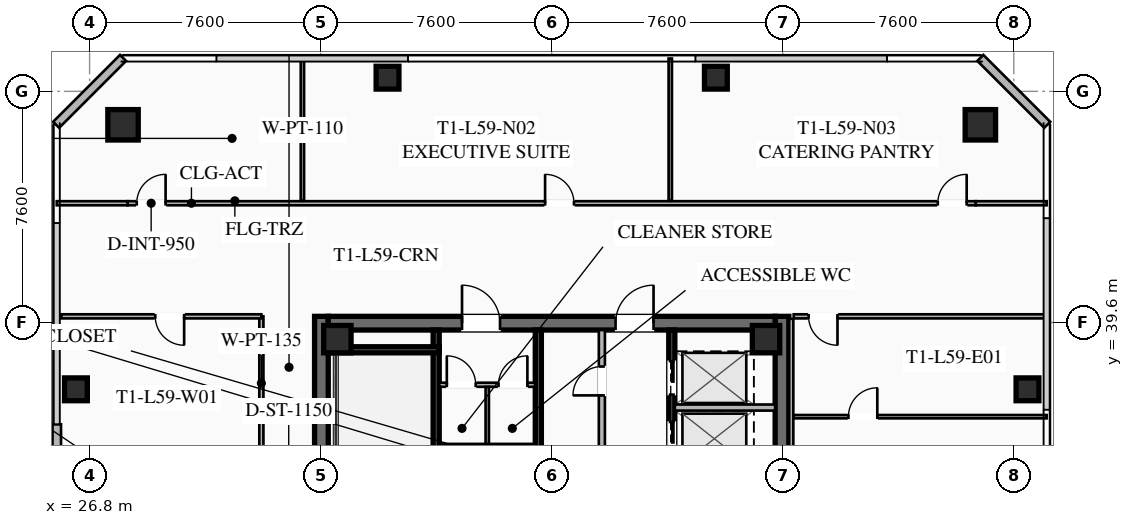
"""IFC4 building model, lengths in metres.
Left out: names, types, materials, properties, quantities, classifications, styles, units other than length and angle.
Written with IfcOpenShell. Run it as: python <this file> out.ifc"""

import sys

from ifc_helpers import new_model, si_unit, direction, frame, frame_2d, origin, origin_2d, place, context, subcontext, project, spatial, rectangle, hollow_rectangle, extrude, element, fill, save


model = new_model("IFC4")
c1 = context("Model", 3, precision=1e-05, world=origin(), true_north=direction((0.0, 1.0)))
c2 = subcontext(c1, "Body", "Model", "MODEL_VIEW")
j1 = project(units=[si_unit("LENGTHUNIT", "METRE"), si_unit("PLANEANGLEUNIT", "RADIAN")], contexts=[c1])
p1 = place(None, origin())
s1 = spatial("IfcSite", under=j1, at=p1, CompositionType="ELEMENT")
p2 = place(p1, origin())
s2 = spatial("IfcBuilding", under=s1, at=p2, CompositionType="ELEMENT")
p3 = place(p2, frame((0.0, 0.0, 218.4)))
s3 = spatial("IfcBuildingStorey", under=s2, at=p3, CompositionType="ELEMENT", Elevation=218.4)
for number, where, z_axis, x_axis in (
    (1, (34.425, 24.2, 0.0), (0.0, 0.0, 1.0), (0.0, 1.0, 0.0)),
    (2, (49.575, 39.8, 0.0), (0.0, 0.0, 1.0), (0.0, -1.0, 0.0)),
):
    element("IfcWall", number, at=place(p3, frame(where, z_axis=z_axis, x_axis=x_axis)), inside=s3, PredefinedType="SHEAR", context=c2, shape_type="SweptSolid", body=[
        extrude(rectangle(XDim=15.6, YDim=0.45, at=frame_2d((7.8, 0.0))), origin(), (0.0, 0.0, 1.0), 3.55),
    ])
p4 = place(p3, frame((34.65, 39.575, 0.0), z_axis=(0.0, 0.0, 1.0), x_axis=(1.0, 0.0, 0.0)))
e3 = element("IfcWall", 3, at=p4, inside=s3, PredefinedType="SHEAR", context=c2, shape_type="SweptSolid", body=[
    extrude(rectangle(XDim=14.7, YDim=0.45, at=frame_2d((7.35, 0.0))), origin(), (0.0, 0.0, 1.0), 3.55),
])
p5 = place(p4, frame((4.4, 0.0, 0.0)))
e4 = element("IfcOpeningElement", 4, at=p5, cuts=e3, PredefinedType="OPENING", context=c2, shape_type="SweptSolid", body=[
    extrude(rectangle(XDim=1.25, YDim=2.25, at=frame_2d((0.625, 1.125))), frame((0.0, 0.235, 0.0), z_axis=(0.0, -1.0, 0.0), x_axis=(1.0, 0.0, 0.0)), (0.0, 0.0, 1.0), 0.47),
])
p6 = place(p4, frame((9.45, 0.0, 0.0)))
e5 = element("IfcOpeningElement", 5, at=p6, cuts=e3, PredefinedType="OPENING", context=c2, shape_type="SweptSolid", body=[
    extrude(rectangle(XDim=1.25, YDim=2.25, at=frame_2d((0.625, 1.125))), frame((0.0, 0.235, 0.0), z_axis=(0.0, -1.0, 0.0), x_axis=(1.0, 0.0, 0.0)), (0.0, 0.0, 1.0), 0.47),
])
for number, where, z_axis, x_axis in (
    (6, (49.05, 39.05, 0.0), (0.0, 0.0, 1.0), (1.0, 0.0, 0.0)),
    (7, (34.95, 39.05, 0.0), (0.0, 0.0, 1.0), (1.0, 0.0, 0.0)),
):
    element("IfcColumn", number, at=place(p3, frame(where, z_axis=z_axis, x_axis=x_axis)), inside=s3, PredefinedType="COLUMN", context=c2, shape_type="SweptSolid", body=[
        extrude(hollow_rectangle(XDim=0.9, YDim=0.9, WallThickness=0.04, at=origin_2d()), origin(), (0.0, 0.0, 1.0), 3.37),
    ])
for number, where, z_axis, x_axis in (
    (8, (56.1, 46.1, 0.0), (0.0, 0.0, 1.0), (1.0, 0.0, 0.0)),
    (9, (27.9, 46.1, 0.0), (0.0, 0.0, 1.0), (1.0, 0.0, 0.0)),
):
    element("IfcColumn", number, at=place(p3, frame(where, z_axis=z_axis, x_axis=x_axis)), inside=s3, PredefinedType="COLUMN", context=c2, shape_type="SweptSolid", body=[
        extrude(hollow_rectangle(XDim=1.0, YDim=1.0, WallThickness=0.04, at=origin_2d()), origin(), (0.0, 0.0, 1.0), 3.37),
    ])
for number, where, z_axis, x_axis in (
    (10, (57.65, 37.4, 0.0), (0.0, 0.0, 1.0), (1.0, 0.0, 0.0)),
    (11, (47.4, 47.65, 0.0), (0.0, 0.0, 1.0), (1.0, 0.0, 0.0)),
    (12, (36.6, 47.65, 0.0), (0.0, 0.0, 1.0), (1.0, 0.0, 0.0)),
    (13, (26.35, 37.4, 0.0), (0.0, 0.0, 1.0), (1.0, 0.0, 0.0)),
):
    element("IfcColumn", number, at=place(p3, frame(where, z_axis=z_axis, x_axis=x_axis)), inside=s3, PredefinedType="COLUMN", context=c2, shape_type="SweptSolid", body=[
        extrude(hollow_rectangle(XDim=0.75, YDim=0.75, WallThickness=0.032, at=origin_2d()), origin(), (0.0, 0.0, 1.0), 3.37),
    ])
p7 = place(p3, frame((25.72, 27.75, 0.0), z_axis=(0.0, 0.0, 1.0), x_axis=(0.0, 1.0, 0.0)))
e14 = element("IfcWall", 14, at=p7, inside=s3, PredefinedType="SOLIDWALL", context=c2, shape_type="SweptSolid", body=[
    extrude(rectangle(XDim=8.5, YDim=0.28, at=frame_2d((4.25, 0.0))), origin(), (0.0, 0.0, 1.0), 3.37),
])
p8 = place(p7, frame((3.6, 0.0, 0.0)))
e15 = element("IfcOpeningElement", 15, at=p8, cuts=e14, PredefinedType="OPENING", context=c2, shape_type="SweptSolid", body=[
    extrude(rectangle(XDim=1.3, YDim=2.15, at=frame_2d((0.65, 1.075))), frame((0.0, 0.15, 0.0), z_axis=(0.0, -1.0, 0.0), x_axis=(1.0, 0.0, 0.0)), (0.0, 0.0, 1.0), 0.3),
])
p9 = place(p7, frame((1.46, 0.0, 0.85)))
e16 = element("IfcOpeningElement", 16, at=p9, cuts=e14, PredefinedType="OPENING", context=c2, shape_type="SweptSolid", body=[
    extrude(rectangle(XDim=1.8, YDim=1.92, at=frame_2d((0.9, 0.96))), frame((0.0, 0.15, 0.0), z_axis=(0.0, -1.0, 0.0), x_axis=(1.0, 0.0, 0.0)), (0.0, 0.0, 1.0), 0.3),
])
for number, where, z_axis, x_axis in (
    (17, (25.7, 46.1, 0.0), (0.0, 0.0, 1.0), (0.707, 0.707, 0.0)),
    (18, (56.1, 48.3, 0.0), (0.0, 0.0, 1.0), (0.707, -0.707, 0.0)),
):
    element("IfcWall", number, at=place(p3, frame(where, z_axis=z_axis, x_axis=x_axis)), inside=s3, PredefinedType="SOLIDWALL", context=c2, shape_type="SweptSolid", body=[
        extrude(rectangle(XDim=3.111, YDim=0.28, at=frame_2d((1.556, 0.0))), origin(), (0.0, 0.0, 1.0), 3.37),
    ])
p10 = place(p3, frame((38.2, 31.2, 0.0), z_axis=(0.0, 0.0, 1.0), x_axis=(0.0, 1.0, 0.0)))
e19 = element("IfcWall", 19, at=p10, inside=s3, PredefinedType="SHEAR", context=c2, shape_type="SweptSolid", body=[
    extrude(rectangle(XDim=8.15, YDim=0.2, at=frame_2d((4.075, 0.0))), origin(), (0.0, 0.0, 1.0), 3.37),
])
p11 = place(p10, frame((0.45, 0.0, 0.0)))
e20 = element("IfcOpeningElement", 20, at=p11, cuts=e19, PredefinedType="OPENING", context=c2, shape_type="SweptSolid", body=[
    extrude(rectangle(XDim=1.15, YDim=2.2, at=frame_2d((0.575, 1.1))), frame((0.0, 0.11, 0.0), z_axis=(0.0, -1.0, 0.0), x_axis=(1.0, 0.0, 0.0)), (0.0, 0.0, 1.0), 0.22),
])
p12 = place(p3, frame((34.65, 38.7, 0.0), z_axis=(0.0, 0.0, 1.0), x_axis=(1.0, 0.0, 0.0)))
e21 = element("IfcWall", 21, at=p12, inside=s3, PredefinedType="SHEAR", context=c2, shape_type="SweptSolid", body=[
    extrude(rectangle(XDim=3.65, YDim=0.2, at=frame_2d((1.825, 0.0))), origin(), (0.0, 0.0, 1.0), 3.37),
])
p13 = place(p3, frame((41.56, 24.65, 0.0), z_axis=(0.0, 0.0, 1.0), x_axis=(0.0, 1.0, 0.0)))
e22 = element("IfcWall", 22, at=p13, inside=s3, PredefinedType="SHEAR", context=c2, shape_type="SweptSolid", body=[
    extrude(rectangle(XDim=14.7, YDim=0.2, at=frame_2d((7.35, 0.0))), origin(), (0.0, 0.0, 1.0), 3.37),
])
p14 = place(p3, frame((45.95, 39.35, 0.0), z_axis=(0.0, 0.0, 1.0), x_axis=(0.0, -1.0, 0.0)))
e23 = element("IfcWall", 23, at=p14, inside=s3, PredefinedType="SHEAR", context=c2, shape_type="SweptSolid", body=[
    extrude(rectangle(XDim=6.55, YDim=0.2, at=frame_2d((3.275, 0.0))), origin(), (0.0, 0.0, 1.0), 3.37),
])
p15 = place(p14, frame((5.075, 0.0, 0.0)))
e24 = element("IfcOpeningElement", 24, at=p15, cuts=e23, PredefinedType="OPENING", context=c2, shape_type="SweptSolid", body=[
    extrude(rectangle(XDim=1.1, YDim=2.2, at=frame_2d((0.55, 1.1))), frame((0.0, 0.11, 0.0), z_axis=(0.0, -1.0, 0.0), x_axis=(1.0, 0.0, 0.0)), (0.0, 0.0, 1.0), 0.22),
])
p16 = place(p14, frame((3.025, 0.0, 0.0)))
e25 = element("IfcOpeningElement", 25, at=p16, cuts=e23, PredefinedType="OPENING", context=c2, shape_type="SweptSolid", body=[
    extrude(rectangle(XDim=1.1, YDim=2.2, at=frame_2d((0.55, 1.1))), frame((0.0, 0.11, 0.0), z_axis=(0.0, -1.0, 0.0), x_axis=(1.0, 0.0, 0.0)), (0.0, 0.0, 1.0), 0.22),
])
p17 = place(p14, frame((1.025, 0.0, 0.0)))
e26 = element("IfcOpeningElement", 26, at=p17, cuts=e23, PredefinedType="OPENING", context=c2, shape_type="SweptSolid", body=[
    extrude(rectangle(XDim=1.1, YDim=2.2, at=frame_2d((0.55, 1.1))), frame((0.0, 0.11, 0.0), z_axis=(0.0, -1.0, 0.0), x_axis=(1.0, 0.0, 0.0)), (0.0, 0.0, 1.0), 0.22),
])
p18 = place(p3, frame((46.05, 36.8, 0.0), z_axis=(0.0, 0.0, 1.0), x_axis=(1.0, 0.0, 0.0)))
e27 = element("IfcWall", 27, at=p18, inside=s3, PredefinedType="SOLIDWALL", context=c2, shape_type="SweptSolid", body=[
    extrude(rectangle(XDim=3.3, YDim=0.2, at=frame_2d((1.65, 0.0))), origin(), (0.0, 0.0, 1.0), 3.37),
])
p19 = place(p3, frame((38.3, 37.55, 0.0), z_axis=(0.0, 0.0, 1.0), x_axis=(1.0, 0.0, 0.0)))
e28 = element("IfcWall", 28, at=p19, inside=s3, PredefinedType="PARTITIONING", context=c2, shape_type="SweptSolid", body=[
    extrude(rectangle(XDim=3.15, YDim=0.135, at=frame_2d((1.575, 0.0))), origin(), (0.0, 0.0, 1.0), 2.723),
])
p20 = place(p19, frame((0.25, 0.0, 0.0)))
e29 = element("IfcOpeningElement", 29, at=p20, cuts=e28, PredefinedType="OPENING", context=c2, shape_type="SweptSolid", body=[
    extrude(rectangle(XDim=0.95, YDim=2.05, at=frame_2d((0.475, 1.025))), frame((0.0, 0.077, 0.0), z_axis=(0.0, -1.0, 0.0), x_axis=(1.0, 0.0, 0.0)), (0.0, 0.0, 1.0), 0.155),
])
p21 = place(p19, frame((1.95, 0.0, 0.0)))
e30 = element("IfcOpeningElement", 30, at=p21, cuts=e28, PredefinedType="OPENING", context=c2, shape_type="SweptSolid", body=[
    extrude(rectangle(XDim=0.95, YDim=2.05, at=frame_2d((0.475, 1.025))), frame((0.0, 0.077, 0.0), z_axis=(0.0, -1.0, 0.0), x_axis=(1.0, 0.0, 0.0)), (0.0, 0.0, 1.0), 0.155),
])
p22 = place(p3, frame((39.88, 33.68, 0.0), z_axis=(0.0, 0.0, 1.0), x_axis=(0.0, 1.0, 0.0)))
e31 = element("IfcWall", 31, at=p22, inside=s3, PredefinedType="PARTITIONING", context=c2, shape_type="SweptSolid", body=[
    extrude(rectangle(XDim=3.8, YDim=0.11, at=frame_2d((1.9, 0.0))), origin(), (0.0, 0.0, 1.0), 2.723),
])
p23 = place(p3, frame((38.3, 35.55, 0.0), z_axis=(0.0, 0.0, 1.0), x_axis=(1.0, 0.0, 0.0)))
e32 = element("IfcWall", 32, at=p23, inside=s3, PredefinedType="PARTITIONING", context=c2, shape_type="SweptSolid", body=[
    extrude(rectangle(XDim=3.15, YDim=0.11, at=frame_2d((1.575, 0.0))), origin(), (0.0, 0.0, 1.0), 2.723),
])
p24 = place(p3, frame((43.65, 32.35, 0.0), z_axis=(0.0, 0.0, 1.0), x_axis=(0.0, 1.0, 0.0)))
e33 = element("IfcWall", 33, at=p24, inside=s3, PredefinedType="SOLIDWALL", context=c2, shape_type="SweptSolid", body=[
    extrude(rectangle(XDim=7.0, YDim=0.2, at=frame_2d((3.5, 0.0))), origin(), (0.0, 0.0, 1.0), 2.723),
])
p25 = place(p24, frame((0.85, 0.0, 0.0)))
e34 = element("IfcOpeningElement", 34, at=p25, cuts=e33, PredefinedType="OPENING", context=c2, shape_type="SweptSolid", body=[
    extrude(rectangle(XDim=0.95, YDim=2.05, at=frame_2d((0.475, 1.025))), frame((0.0, 0.11, 0.0), z_axis=(0.0, -1.0, 0.0), x_axis=(1.0, 0.0, 0.0)), (0.0, 0.0, 1.0), 0.22),
])
p26 = place(p24, frame((4.85, 0.0, 0.0)))
e35 = element("IfcOpeningElement", 35, at=p26, cuts=e33, PredefinedType="OPENING", context=c2, shape_type="SweptSolid", body=[
    extrude(rectangle(XDim=0.95, YDim=2.05, at=frame_2d((0.475, 1.025))), frame((0.0, 0.11, 0.0), z_axis=(0.0, -1.0, 0.0), x_axis=(1.0, 0.0, 0.0)), (0.0, 0.0, 1.0), 0.22),
])
p27 = place(p3, frame((32.45, 35.4, 0.0), z_axis=(0.0, 0.0, 1.0), x_axis=(0.0, 1.0, 0.0)))
e36 = element("IfcWall", 36, at=p27, inside=s3, PredefinedType="PARTITIONING", context=c2, shape_type="SweptSolid", body=[
    extrude(rectangle(XDim=4.4, YDim=0.135, at=frame_2d((2.2, 0.0))), origin(), (0.0, 0.0, 1.0), 2.723),
])
p28 = place(p3, frame((28.05, 43.52, 0.0), z_axis=(0.0, 0.0, 1.0), x_axis=(1.0, 0.0, 0.0)))
e37 = element("IfcWall", 37, at=p28, inside=s3, PredefinedType="PARTITIONING", context=c2, shape_type="SweptSolid", body=[
    extrude(rectangle(XDim=27.9, YDim=0.135, at=frame_2d((13.95, 0.0))), origin(), (0.0, 0.0, 1.0), 2.723),
])
p29 = place(p28, frame((0.3, 0.0, 0.0)))
e38 = element("IfcOpeningElement", 38, at=p29, cuts=e37, PredefinedType="OPENING", context=c2, shape_type="SweptSolid", body=[
    extrude(rectangle(XDim=0.95, YDim=2.05, at=frame_2d((0.475, 1.025))), frame((0.0, 0.077, 0.0), z_axis=(0.0, -1.0, 0.0), x_axis=(1.0, 0.0, 0.0)), (0.0, 0.0, 1.0), 0.155),
])
p30 = place(p28, frame((13.732, 0.0, 0.0)))
e39 = element("IfcOpeningElement", 39, at=p30, cuts=e37, PredefinedType="OPENING", context=c2, shape_type="SweptSolid", body=[
    extrude(rectangle(XDim=0.95, YDim=2.05, at=frame_2d((0.475, 1.025))), frame((0.0, 0.077, 0.0), z_axis=(0.0, -1.0, 0.0), x_axis=(1.0, 0.0, 0.0)), (0.0, 0.0, 1.0), 0.155),
])
p31 = place(p28, frame((26.65, 0.0, 0.0)))
e40 = element("IfcOpeningElement", 40, at=p31, cuts=e37, PredefinedType="OPENING", context=c2, shape_type="SweptSolid", body=[
    extrude(rectangle(XDim=0.95, YDim=2.05, at=frame_2d((0.475, 1.025))), frame((0.0, 0.077, 0.0), z_axis=(0.0, -1.0, 0.0), x_axis=(1.0, 0.0, 0.0)), (0.0, 0.0, 1.0), 0.155),
])
for number, where, z_axis, x_axis in (
    (41, (25.72, 43.52, 0.0), (0.0, 0.0, 1.0), (1.0, 0.0, 0.0)),
    (42, (55.95, 43.52, 0.0), (0.0, 0.0, 1.0), (1.0, 0.0, 0.0)),
):
    element("IfcWall", number, at=place(p3, frame(where, z_axis=z_axis, x_axis=x_axis)), inside=s3, PredefinedType="PARTITIONING", context=c2, shape_type="SweptSolid", body=[
        extrude(rectangle(XDim=2.33, YDim=0.135, at=frame_2d((1.165, 0.0))), origin(), (0.0, 0.0, 1.0), 2.723),
    ])
for number, where, z_axis, x_axis in (
    (43, (33.8, 43.6, 0.0), (0.0, 0.0, 1.0), (0.0, 1.0, 0.0)),
    (44, (45.9, 43.6, 0.0), (0.0, 0.0, 1.0), (0.0, 1.0, 0.0)),
):
    element("IfcWall", number, at=place(p3, frame(where, z_axis=z_axis, x_axis=x_axis)), inside=s3, PredefinedType="PARTITIONING", context=c2, shape_type="SweptSolid", body=[
        extrude(rectangle(XDim=4.68, YDim=0.11, at=frame_2d((2.34, 0.0))), origin(), (0.0, 0.0, 1.0), 2.723),
    ])
p32 = place(p3, frame((49.88, 39.72, 0.0), z_axis=(0.0, 0.0, 1.0), x_axis=(0.0, -1.0, 0.0)))
e45 = element("IfcWall", 45, at=p32, inside=s3, PredefinedType="PARTITIONING", context=c2, shape_type="SweptSolid", body=[
    extrude(rectangle(XDim=15.44, YDim=0.135, at=frame_2d((7.72, 0.0))), origin(), (0.0, 0.0, 1.0), 2.723),
])
p33 = place(p3, frame((58.28, 39.8, 0.0), z_axis=(0.0, 0.0, 1.0), x_axis=(-1.0, 0.0, 0.0)))
e46 = element("IfcWall", 46, at=p33, inside=s3, PredefinedType="PARTITIONING", context=c2, shape_type="SweptSolid", body=[
    extrude(rectangle(XDim=8.32, YDim=0.135, at=frame_2d((4.16, 0.0))), origin(), (0.0, 0.0, 1.0), 2.723),
])
p34 = place(p33, frame((6.88, 0.0, 0.0)))
e47 = element("IfcOpeningElement", 47, at=p34, cuts=e46, PredefinedType="OPENING", context=c2, shape_type="SweptSolid", body=[
    extrude(rectangle(XDim=0.95, YDim=2.05, at=frame_2d((0.475, 1.025))), frame((0.0, 0.077, 0.0), z_axis=(0.0, -1.0, 0.0), x_axis=(1.0, 0.0, 0.0)), (0.0, 0.0, 1.0), 0.155),
])
p35 = place(p3, frame((49.96, 36.5, 0.0), z_axis=(0.0, 0.0, 1.0), x_axis=(1.0, 0.0, 0.0)))
e48 = element("IfcWall", 48, at=p35, inside=s3, PredefinedType="PARTITIONING", context=c2, shape_type="SweptSolid", body=[
    extrude(rectangle(XDim=8.32, YDim=0.11, at=frame_2d((4.16, 0.0))), origin(), (0.0, 0.0, 1.0), 2.723),
])
p36 = place(p35, frame((1.8, 0.0, 0.0)))
e49 = element("IfcOpeningElement", 49, at=p36, cuts=e48, PredefinedType="OPENING", context=c2, shape_type="SweptSolid", body=[
    extrude(rectangle(XDim=0.95, YDim=2.05, at=frame_2d((0.475, 1.025))), frame((0.0, 0.065, 0.0), z_axis=(0.0, -1.0, 0.0), x_axis=(1.0, 0.0, 0.0)), (0.0, 0.0, 1.0), 0.13),
])
p37 = place(p3, frame((32.45, 39.8, 0.0), z_axis=(0.0, 0.0, 1.0), x_axis=(-1.0, 0.0, 0.0)))
e50 = element("IfcWall", 50, at=p37, inside=s3, PredefinedType="PARTITIONING", context=c2, shape_type="SweptSolid", body=[
    extrude(rectangle(XDim=6.58, YDim=0.135, at=frame_2d((3.29, 0.0))), origin(), (0.0, 0.0, 1.0), 2.723),
])
p38 = place(p37, frame((2.54, 0.0, 0.0)))
e51 = element("IfcOpeningElement", 51, at=p38, cuts=e50, PredefinedType="OPENING", context=c2, shape_type="SweptSolid", body=[
    extrude(rectangle(XDim=0.95, YDim=2.05, at=frame_2d((0.475, 1.025))), frame((0.0, 0.077, 0.0), z_axis=(0.0, -1.0, 0.0), x_axis=(1.0, 0.0, 0.0)), (0.0, 0.0, 1.0), 0.155),
])
p39 = place(p5, origin())
e52 = element("IfcDoor", 52, at=p39, inside=s3, OperationType="SINGLE_SWING_LEFT", PredefinedType="DOOR", context=c2, shape_type="SweptSolid", body=[
    extrude(rectangle(XDim=1.25, YDim=2.25, at=frame_2d((0.625, 1.125))), frame((0.0, 0.025, 0.0), z_axis=(0.0, -1.0, 0.0), x_axis=(1.0, 0.0, 0.0)), (0.0, 0.0, 1.0), 0.05),
])
fill(e4, e52)
p40 = place(p6, origin())
e53 = element("IfcDoor", 53, at=p40, inside=s3, OperationType="SINGLE_SWING_RIGHT", PredefinedType="DOOR", context=c2, shape_type="SweptSolid", body=[
    extrude(rectangle(XDim=1.25, YDim=2.25, at=frame_2d((0.625, 1.125))), frame((0.0, 0.025, 0.0), z_axis=(0.0, -1.0, 0.0), x_axis=(1.0, 0.0, 0.0)), (0.0, 0.0, 1.0), 0.05),
])
fill(e5, e53)
p41 = place(p20, origin())
e54 = element("IfcDoor", 54, at=p41, inside=s3, OperationType="SINGLE_SWING_LEFT", PredefinedType="DOOR", context=c2, shape_type="SweptSolid", body=[
    extrude(rectangle(XDim=0.95, YDim=2.05, at=frame_2d((0.475, 1.025))), frame((0.0, 0.025, 0.0), z_axis=(0.0, -1.0, 0.0), x_axis=(1.0, 0.0, 0.0)), (0.0, 0.0, 1.0), 0.05),
])
fill(e29, e54)
p42 = place(p21, origin())
e55 = element("IfcDoor", 55, at=p42, inside=s3, OperationType="SINGLE_SWING_RIGHT", PredefinedType="DOOR", context=c2, shape_type="SweptSolid", body=[
    extrude(rectangle(XDim=0.95, YDim=2.05, at=frame_2d((0.475, 1.025))), frame((0.0, 0.025, 0.0), z_axis=(0.0, -1.0, 0.0), x_axis=(1.0, 0.0, 0.0)), (0.0, 0.0, 1.0), 0.05),
])
fill(e30, e55)
p43 = place(p26, origin())
e56 = element("IfcDoor", 56, at=p43, inside=s3, OperationType="SINGLE_SWING_LEFT", PredefinedType="DOOR", context=c2, shape_type="SweptSolid", body=[
    extrude(rectangle(XDim=0.95, YDim=2.05, at=frame_2d((0.475, 1.025))), frame((0.0, 0.025, 0.0), z_axis=(0.0, -1.0, 0.0), x_axis=(1.0, 0.0, 0.0)), (0.0, 0.0, 1.0), 0.05),
])
fill(e35, e56)
p44 = place(p29, origin())
e57 = element("IfcDoor", 57, at=p44, inside=s3, OperationType="SINGLE_SWING_RIGHT", PredefinedType="DOOR", context=c2, shape_type="SweptSolid", body=[
    extrude(rectangle(XDim=0.95, YDim=2.05, at=frame_2d((0.475, 1.025))), frame((0.0, 0.025, 0.0), z_axis=(0.0, -1.0, 0.0), x_axis=(1.0, 0.0, 0.0)), (0.0, 0.0, 1.0), 0.05),
])
fill(e38, e57)
p45 = place(p30, origin())
e58 = element("IfcDoor", 58, at=p45, inside=s3, OperationType="SINGLE_SWING_LEFT", PredefinedType="DOOR", context=c2, shape_type="SweptSolid", body=[
    extrude(rectangle(XDim=0.95, YDim=2.05, at=frame_2d((0.475, 1.025))), frame((0.0, 0.025, 0.0), z_axis=(0.0, -1.0, 0.0), x_axis=(1.0, 0.0, 0.0)), (0.0, 0.0, 1.0), 0.05),
])
fill(e39, e58)
p46 = place(p31, origin())
e59 = element("IfcDoor", 59, at=p46, inside=s3, OperationType="SINGLE_SWING_RIGHT", PredefinedType="DOOR", context=c2, shape_type="SweptSolid", body=[
    extrude(rectangle(XDim=0.95, YDim=2.05, at=frame_2d((0.475, 1.025))), frame((0.0, 0.025, 0.0), z_axis=(0.0, -1.0, 0.0), x_axis=(1.0, 0.0, 0.0)), (0.0, 0.0, 1.0), 0.05),
])
fill(e40, e59)
p47 = place(p34, origin())
e60 = element("IfcDoor", 60, at=p47, inside=s3, OperationType="SINGLE_SWING_LEFT", PredefinedType="DOOR", context=c2, shape_type="SweptSolid", body=[
    extrude(rectangle(XDim=0.95, YDim=2.05, at=frame_2d((0.475, 1.025))), frame((0.0, 0.025, 0.0), z_axis=(0.0, -1.0, 0.0), x_axis=(1.0, 0.0, 0.0)), (0.0, 0.0, 1.0), 0.05),
])
fill(e47, e60)
p48 = place(p36, origin())
e61 = element("IfcDoor", 61, at=p48, inside=s3, OperationType="SINGLE_SWING_RIGHT", PredefinedType="DOOR", context=c2, shape_type="SweptSolid", body=[
    extrude(rectangle(XDim=0.95, YDim=2.05, at=frame_2d((0.475, 1.025))), frame((0.0, 0.025, 0.0), z_axis=(0.0, -1.0, 0.0), x_axis=(1.0, 0.0, 0.0)), (0.0, 0.0, 1.0), 0.05),
])
fill(e49, e61)
p49 = place(p38, origin())
e62 = element("IfcDoor", 62, at=p49, inside=s3, OperationType="SINGLE_SWING_LEFT", PredefinedType="DOOR", context=c2, shape_type="SweptSolid", body=[
    extrude(rectangle(XDim=0.95, YDim=2.05, at=frame_2d((0.475, 1.025))), frame((0.0, 0.025, 0.0), z_axis=(0.0, -1.0, 0.0), x_axis=(1.0, 0.0, 0.0)), (0.0, 0.0, 1.0), 0.05),
])
fill(e51, e62)
p50 = place(p16, origin())
e63 = element("IfcDoor", 63, at=p50, inside=s3, OperationType="SLIDING_TO_LEFT", PredefinedType="DOOR", context=c2, shape_type="SweptSolid", body=[
    extrude(rectangle(XDim=1.1, YDim=2.2, at=frame_2d((0.55, 1.1))), frame((0.0, 0.025, 0.0), z_axis=(0.0, -1.0, 0.0), x_axis=(1.0, 0.0, 0.0)), (0.0, 0.0, 1.0), 0.05),
])
fill(e25, e63)
p51 = place(p17, origin())
e64 = element("IfcDoor", 64, at=p51, inside=s3, OperationType="SLIDING_TO_LEFT", PredefinedType="DOOR", context=c2, shape_type="SweptSolid", body=[
    extrude(rectangle(XDim=1.1, YDim=2.2, at=frame_2d((0.55, 1.1))), frame((0.0, 0.025, 0.0), z_axis=(0.0, -1.0, 0.0), x_axis=(1.0, 0.0, 0.0)), (0.0, 0.0, 1.0), 0.05),
])
fill(e26, e64)
save(model, sys.argv[1])
